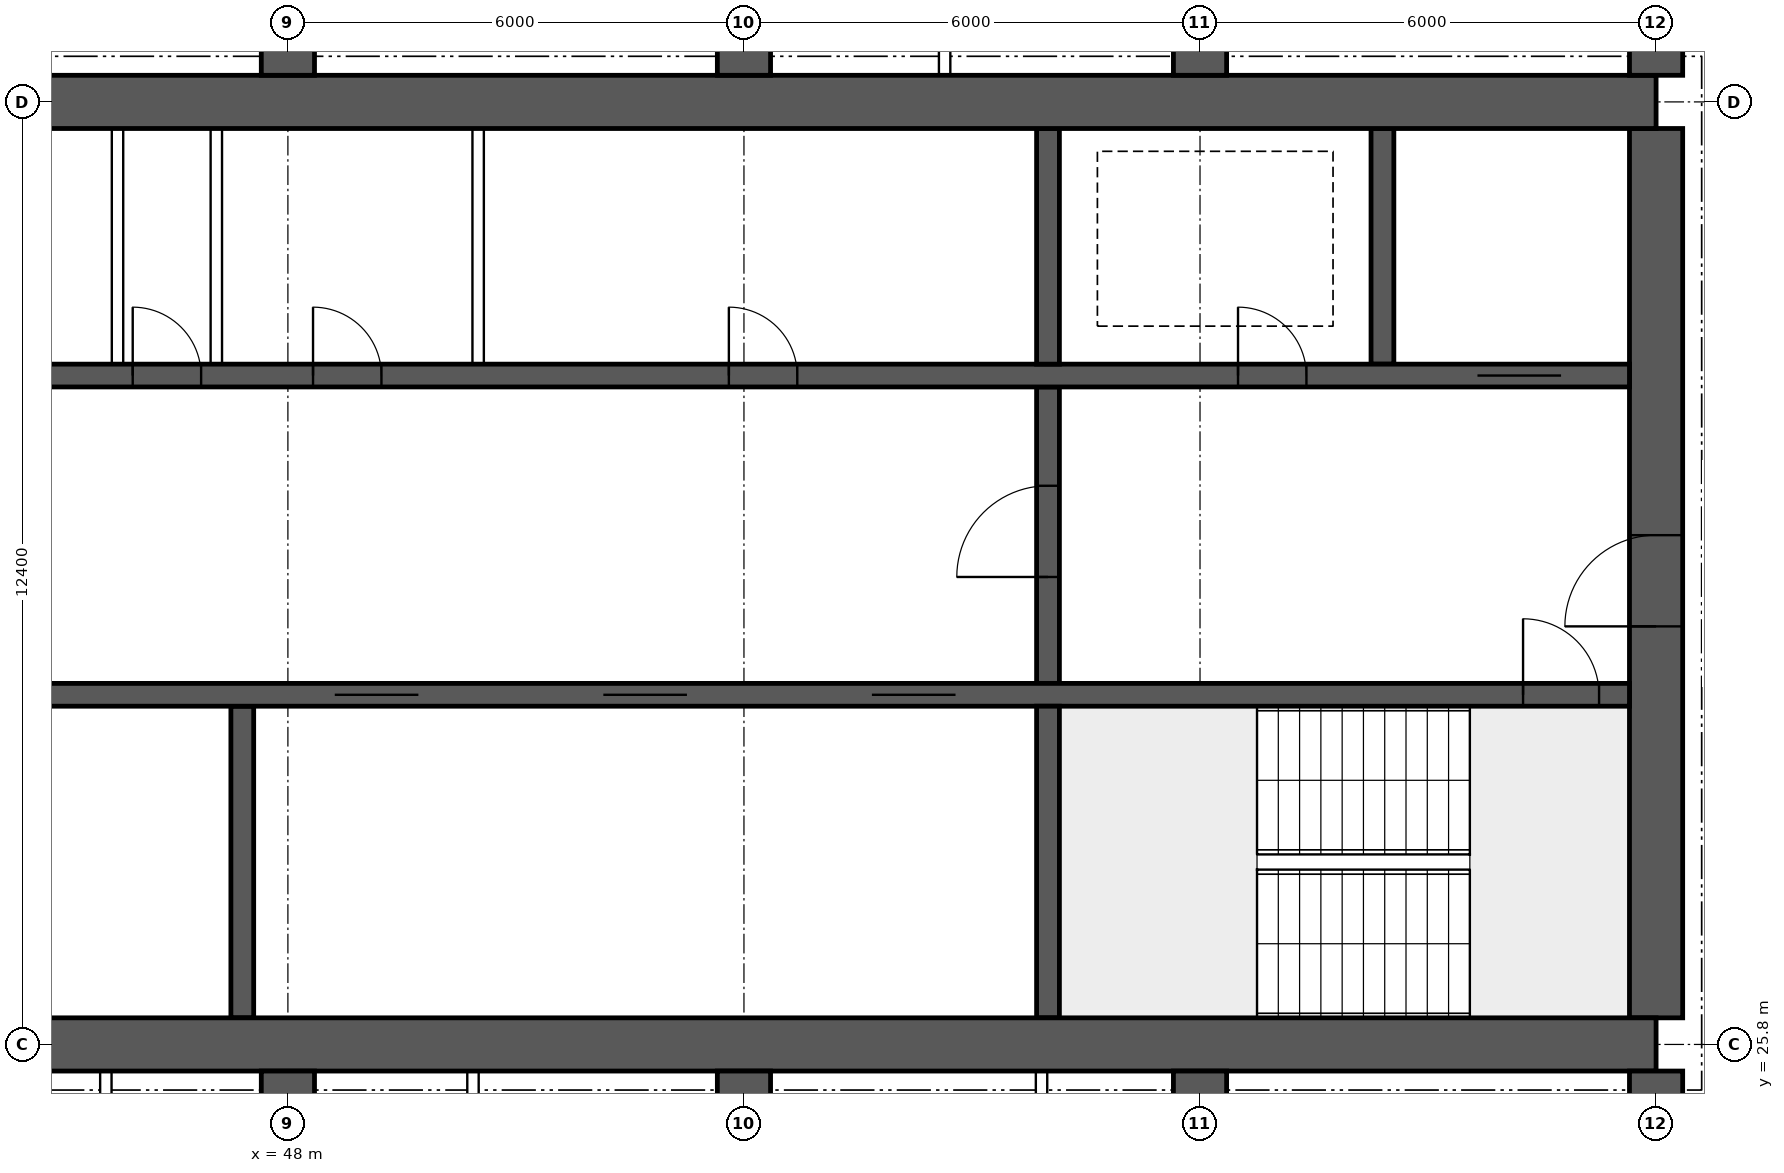
"""IFC4 building model, lengths in metres.
Left out: names, types, materials, properties, quantities, classifications, styles, units other than length and angle.
Written with IfcOpenShell. Run it as: python <this file> out.ifc"""

import sys

from ifc_helpers import new_model, si_unit, direction, frame, frame_2d, origin, place, context, subcontext, project, spatial, rectangle, extrude, element, fill, save


model = new_model("IFC4")
c1 = context("Model", 3, precision=1e-05, world=origin(), true_north=direction((0.0, 1.0)))
c2 = subcontext(c1, "Body", "Model", "MODEL_VIEW")
j1 = project(units=[si_unit("LENGTHUNIT", "METRE"), si_unit("PLANEANGLEUNIT", "RADIAN")], contexts=[c1])
p1 = place(None, origin())
s1 = spatial("IfcSite", under=j1, at=p1, CompositionType="ELEMENT")
p2 = place(p1, origin())
s2 = spatial("IfcBuilding", under=s1, at=p2, CompositionType="ELEMENT")
p3 = place(p2, frame((0.0, 0.0, 254.05)))
s3 = spatial("IfcBuildingStorey", under=s2, at=p3, CompositionType="ELEMENT", Elevation=254.05)
for number, where, z_axis, x_axis in (
    (1, (18.0, 25.8, 0.0), (0.0, 0.0, 1.0), (1.0, 0.0, 0.0)),
    (2, (18.0, 38.2, 0.0), (0.0, 0.0, 1.0), (1.0, 0.0, 0.0)),
):
    element("IfcWall", number, at=place(p3, frame(where, z_axis=z_axis, x_axis=x_axis)), inside=s3, PredefinedType="SHEAR", context=c2, shape_type="SweptSolid", body=[
        extrude(rectangle(XDim=48.0, YDim=0.7, at=frame_2d((24.0, 0.0))), origin(), (0.0, 0.0, 1.0), 3.75),
    ])
p4 = place(p3, frame((66.0, 26.15, 0.0), z_axis=(0.0, 0.0, 1.0), x_axis=(0.0, 1.0, 0.0)))
e3 = element("IfcWall", 3, at=p4, inside=s3, PredefinedType="SHEAR", context=c2, shape_type="SweptSolid", body=[
    extrude(rectangle(XDim=11.7, YDim=0.7, at=frame_2d((5.85, 0.0))), origin(), (0.0, 0.0, 1.0), 3.75),
])
p5 = place(p4, frame((5.15, 0.0, 0.0)))
e4 = element("IfcOpeningElement", 4, at=p5, cuts=e3, PredefinedType="OPENING", context=c2, shape_type="SweptSolid", body=[
    extrude(rectangle(XDim=1.2, YDim=2.1, at=frame_2d((0.6, 1.05))), frame((0.0, 0.36, 0.0), z_axis=(0.0, -1.0, 0.0), x_axis=(1.0, 0.0, 0.0)), (0.0, 0.0, 1.0), 0.72),
])
p6 = place(p3, frame((18.35, 30.4, 0.0), z_axis=(0.0, 0.0, 1.0), x_axis=(1.0, 0.0, 0.0)))
e5 = element("IfcWall", 5, at=p6, inside=s3, PredefinedType="SHEAR", context=c2, shape_type="SweptSolid", body=[
    extrude(rectangle(XDim=47.3, YDim=0.3, at=frame_2d((23.65, 0.0))), origin(), (0.0, 0.0, 1.0), 3.75),
])
p7 = place(p6, frame((0.4, 0.0, 0.0)))
e6 = element("IfcOpeningElement", 6, at=p7, cuts=e5, PredefinedType="OPENING", context=c2, shape_type="SweptSolid", body=[
    extrude(rectangle(XDim=1.0, YDim=2.1, at=frame_2d((0.5, 1.05))), frame((0.0, 0.16, 0.0), z_axis=(0.0, -1.0, 0.0), x_axis=(1.0, 0.0, 0.0)), (0.0, 0.0, 1.0), 0.32),
])
p8 = place(p6, frame((45.9, 0.0, 0.0)))
e7 = element("IfcOpeningElement", 7, at=p8, cuts=e5, PredefinedType="OPENING", context=c2, shape_type="SweptSolid", body=[
    extrude(rectangle(XDim=1.0, YDim=2.1, at=frame_2d((0.5, 1.05))), frame((0.0, 0.16, 0.0), z_axis=(0.0, -1.0, 0.0), x_axis=(1.0, 0.0, 0.0)), (0.0, 0.0, 1.0), 0.32),
])
p9 = place(p6, frame((8.4, 0.0, 0.0)))
e8 = element("IfcOpeningElement", 8, at=p9, cuts=e5, PredefinedType="OPENING", context=c2, shape_type="SweptSolid", body=[
    extrude(rectangle(XDim=1.1, YDim=2.1, at=frame_2d((0.55, 1.05))), frame((0.0, 0.16, 0.0), z_axis=(0.0, -1.0, 0.0), x_axis=(1.0, 0.0, 0.0)), (0.0, 0.0, 1.0), 0.32),
])
p10 = place(p6, frame((11.0, 0.0, 0.0)))
e9 = element("IfcOpeningElement", 9, at=p10, cuts=e5, PredefinedType="OPENING", context=c2, shape_type="SweptSolid", body=[
    extrude(rectangle(XDim=1.1, YDim=2.1, at=frame_2d((0.55, 1.05))), frame((0.0, 0.16, 0.0), z_axis=(0.0, -1.0, 0.0), x_axis=(1.0, 0.0, 0.0)), (0.0, 0.0, 1.0), 0.32),
])
p11 = place(p6, frame((13.6, 0.0, 0.0)))
e10 = element("IfcOpeningElement", 10, at=p11, cuts=e5, PredefinedType="OPENING", context=c2, shape_type="SweptSolid", body=[
    extrude(rectangle(XDim=1.1, YDim=2.1, at=frame_2d((0.55, 1.05))), frame((0.0, 0.16, 0.0), z_axis=(0.0, -1.0, 0.0), x_axis=(1.0, 0.0, 0.0)), (0.0, 0.0, 1.0), 0.32),
])
p12 = place(p6, frame((16.2, 0.0, 0.0)))
e11 = element("IfcOpeningElement", 11, at=p12, cuts=e5, PredefinedType="OPENING", context=c2, shape_type="SweptSolid", body=[
    extrude(rectangle(XDim=1.1, YDim=2.1, at=frame_2d((0.55, 1.05))), frame((0.0, 0.16, 0.0), z_axis=(0.0, -1.0, 0.0), x_axis=(1.0, 0.0, 0.0)), (0.0, 0.0, 1.0), 0.32),
])
p13 = place(p6, frame((18.975, 0.0, 0.0)))
e12 = element("IfcOpeningElement", 12, at=p13, cuts=e5, PredefinedType="OPENING", context=c2, shape_type="SweptSolid", body=[
    extrude(rectangle(XDim=0.9, YDim=2.1, at=frame_2d((0.45, 1.05))), frame((0.0, 0.16, 0.0), z_axis=(0.0, -1.0, 0.0), x_axis=(1.0, 0.0, 0.0)), (0.0, 0.0, 1.0), 0.32),
])
p14 = place(p6, frame((24.475, 0.0, 0.0)))
e13 = element("IfcOpeningElement", 13, at=p14, cuts=e5, PredefinedType="OPENING", context=c2, shape_type="SweptSolid", body=[
    extrude(rectangle(XDim=0.9, YDim=2.1, at=frame_2d((0.45, 1.05))), frame((0.0, 0.16, 0.0), z_axis=(0.0, -1.0, 0.0), x_axis=(1.0, 0.0, 0.0)), (0.0, 0.0, 1.0), 0.32),
])
p15 = place(p6, frame((30.267, 0.0, 0.0)))
e14 = element("IfcOpeningElement", 14, at=p15, cuts=e5, PredefinedType="OPENING", context=c2, shape_type="SweptSolid", body=[
    extrude(rectangle(XDim=1.1, YDim=2.1, at=frame_2d((0.55, 1.05))), frame((0.0, 0.16, 0.0), z_axis=(0.0, -1.0, 0.0), x_axis=(1.0, 0.0, 0.0)), (0.0, 0.0, 1.0), 0.32),
])
p16 = place(p6, frame((33.8, 0.0, 0.0)))
e15 = element("IfcOpeningElement", 15, at=p16, cuts=e5, PredefinedType="OPENING", context=c2, shape_type="SweptSolid", body=[
    extrude(rectangle(XDim=1.1, YDim=2.1, at=frame_2d((0.55, 1.05))), frame((0.0, 0.16, 0.0), z_axis=(0.0, -1.0, 0.0), x_axis=(1.0, 0.0, 0.0)), (0.0, 0.0, 1.0), 0.32),
])
p17 = place(p6, frame((37.333, 0.0, 0.0)))
e16 = element("IfcOpeningElement", 16, at=p17, cuts=e5, PredefinedType="OPENING", context=c2, shape_type="SweptSolid", body=[
    extrude(rectangle(XDim=1.1, YDim=2.1, at=frame_2d((0.55, 1.05))), frame((0.0, 0.16, 0.0), z_axis=(0.0, -1.0, 0.0), x_axis=(1.0, 0.0, 0.0)), (0.0, 0.0, 1.0), 0.32),
])
p18 = place(p3, frame((18.35, 34.6, 0.0), z_axis=(0.0, 0.0, 1.0), x_axis=(1.0, 0.0, 0.0)))
e17 = element("IfcWall", 17, at=p18, inside=s3, PredefinedType="SHEAR", context=c2, shape_type="SweptSolid", body=[
    extrude(rectangle(XDim=47.3, YDim=0.3, at=frame_2d((23.65, 0.0))), origin(), (0.0, 0.0, 1.0), 3.75),
])
p19 = place(p18, frame((0.9, 0.0, 0.0)))
e18 = element("IfcOpeningElement", 18, at=p19, cuts=e17, PredefinedType="OPENING", context=c2, shape_type="SweptSolid", body=[
    extrude(rectangle(XDim=1.1, YDim=2.1, at=frame_2d((0.55, 1.05))), frame((0.0, 0.16, 0.0), z_axis=(0.0, -1.0, 0.0), x_axis=(1.0, 0.0, 0.0)), (0.0, 0.0, 1.0), 0.32),
])
p20 = place(p18, frame((45.3, 0.0, 0.0)))
e19 = element("IfcOpeningElement", 19, at=p20, cuts=e17, PredefinedType="OPENING", context=c2, shape_type="SweptSolid", body=[
    extrude(rectangle(XDim=1.1, YDim=2.1, at=frame_2d((0.55, 1.05))), frame((0.0, 0.16, 0.0), z_axis=(0.0, -1.0, 0.0), x_axis=(1.0, 0.0, 0.0)), (0.0, 0.0, 1.0), 0.32),
])
p21 = place(p18, frame((4.25, 0.0, 0.0)))
e20 = element("IfcOpeningElement", 20, at=p21, cuts=e17, PredefinedType="OPENING", context=c2, shape_type="SweptSolid", body=[
    extrude(rectangle(XDim=0.9, YDim=2.1, at=frame_2d((0.45, 1.05))), frame((0.0, 0.16, 0.0), z_axis=(0.0, -1.0, 0.0), x_axis=(1.0, 0.0, 0.0)), (0.0, 0.0, 1.0), 0.32),
])
p22 = place(p18, frame((42.15, 0.0, 0.0)))
e21 = element("IfcOpeningElement", 21, at=p22, cuts=e17, PredefinedType="OPENING", context=c2, shape_type="SweptSolid", body=[
    extrude(rectangle(XDim=0.9, YDim=2.1, at=frame_2d((0.45, 1.05))), frame((0.0, 0.16, 0.0), z_axis=(0.0, -1.0, 0.0), x_axis=(1.0, 0.0, 0.0)), (0.0, 0.0, 1.0), 0.32),
])
p23 = place(p18, frame((9.025, 0.0, 0.0)))
e22 = element("IfcOpeningElement", 22, at=p23, cuts=e17, PredefinedType="OPENING", context=c2, shape_type="SweptSolid", body=[
    extrude(rectangle(XDim=0.9, YDim=2.1, at=frame_2d((0.45, 1.05))), frame((0.0, 0.16, 0.0), z_axis=(0.0, -1.0, 0.0), x_axis=(1.0, 0.0, 0.0)), (0.0, 0.0, 1.0), 0.32),
])
p24 = place(p18, frame((12.999, 0.0, 0.0)))
e23 = element("IfcOpeningElement", 23, at=p24, cuts=e17, PredefinedType="OPENING", context=c2, shape_type="SweptSolid", body=[
    extrude(rectangle(XDim=0.9, YDim=2.1, at=frame_2d((0.45, 1.05))), frame((0.0, 0.16, 0.0), z_axis=(0.0, -1.0, 0.0), x_axis=(1.0, 0.0, 0.0)), (0.0, 0.0, 1.0), 0.32),
])
p25 = place(p18, frame((16.646, 0.0, 0.0)))
e24 = element("IfcOpeningElement", 24, at=p25, cuts=e17, PredefinedType="OPENING", context=c2, shape_type="SweptSolid", body=[
    extrude(rectangle(XDim=0.9, YDim=2.1, at=frame_2d((0.45, 1.05))), frame((0.0, 0.16, 0.0), z_axis=(0.0, -1.0, 0.0), x_axis=(1.0, 0.0, 0.0)), (0.0, 0.0, 1.0), 0.32),
])
p26 = place(p18, frame((20.405, 0.0, 0.0)))
e25 = element("IfcOpeningElement", 25, at=p26, cuts=e17, PredefinedType="OPENING", context=c2, shape_type="SweptSolid", body=[
    extrude(rectangle(XDim=0.9, YDim=2.1, at=frame_2d((0.45, 1.05))), frame((0.0, 0.16, 0.0), z_axis=(0.0, -1.0, 0.0), x_axis=(1.0, 0.0, 0.0)), (0.0, 0.0, 1.0), 0.32),
])
p27 = place(p18, frame((24.811, 0.0, 0.0)))
e26 = element("IfcOpeningElement", 26, at=p27, cuts=e17, PredefinedType="OPENING", context=c2, shape_type="SweptSolid", body=[
    extrude(rectangle(XDim=0.9, YDim=2.1, at=frame_2d((0.45, 1.05))), frame((0.0, 0.16, 0.0), z_axis=(0.0, -1.0, 0.0), x_axis=(1.0, 0.0, 0.0)), (0.0, 0.0, 1.0), 0.32),
])
p28 = place(p18, frame((27.608, 0.0, 0.0)))
e27 = element("IfcOpeningElement", 27, at=p28, cuts=e17, PredefinedType="OPENING", context=c2, shape_type="SweptSolid", body=[
    extrude(rectangle(XDim=0.9, YDim=2.1, at=frame_2d((0.45, 1.05))), frame((0.0, 0.16, 0.0), z_axis=(0.0, -1.0, 0.0), x_axis=(1.0, 0.0, 0.0)), (0.0, 0.0, 1.0), 0.32),
])
p29 = place(p18, frame((29.981, 0.0, 0.0)))
e28 = element("IfcOpeningElement", 28, at=p29, cuts=e17, PredefinedType="OPENING", context=c2, shape_type="SweptSolid", body=[
    extrude(rectangle(XDim=0.9, YDim=2.1, at=frame_2d((0.45, 1.05))), frame((0.0, 0.16, 0.0), z_axis=(0.0, -1.0, 0.0), x_axis=(1.0, 0.0, 0.0)), (0.0, 0.0, 1.0), 0.32),
])
p30 = place(p18, frame((35.451, 0.0, 0.0)))
e29 = element("IfcOpeningElement", 29, at=p30, cuts=e17, PredefinedType="OPENING", context=c2, shape_type="SweptSolid", body=[
    extrude(rectangle(XDim=0.9, YDim=2.1, at=frame_2d((0.45, 1.05))), frame((0.0, 0.16, 0.0), z_axis=(0.0, -1.0, 0.0), x_axis=(1.0, 0.0, 0.0)), (0.0, 0.0, 1.0), 0.32),
])
p31 = place(p3, frame((58.0, 26.15, 0.0), z_axis=(0.0, 0.0, 1.0), x_axis=(0.0, 1.0, 0.0)))
e30 = element("IfcWall", 30, at=p31, inside=s3, PredefinedType="SHEAR", context=c2, shape_type="SweptSolid", body=[
    extrude(rectangle(XDim=4.1, YDim=0.3, at=frame_2d((2.05, 0.0))), origin(), (0.0, 0.0, 1.0), 3.75),
])
p32 = place(p3, frame((58.0, 30.55, 0.0), z_axis=(0.0, 0.0, 1.0), x_axis=(0.0, 1.0, 0.0)))
e31 = element("IfcWall", 31, at=p32, inside=s3, PredefinedType="SHEAR", context=c2, shape_type="SweptSolid", body=[
    extrude(rectangle(XDim=3.9, YDim=0.3, at=frame_2d((1.95, 0.0))), origin(), (0.0, 0.0, 1.0), 3.75),
])
p33 = place(p32, frame((1.4, 0.0, 0.0)))
e32 = element("IfcOpeningElement", 32, at=p33, cuts=e31, PredefinedType="OPENING", context=c2, shape_type="SweptSolid", body=[
    extrude(rectangle(XDim=1.2, YDim=2.1, at=frame_2d((0.6, 1.05))), frame((0.0, 0.16, 0.0), z_axis=(0.0, -1.0, 0.0), x_axis=(1.0, 0.0, 0.0)), (0.0, 0.0, 1.0), 0.32),
])
for number, where, z_axis, x_axis in (
    (33, (62.4, 34.75, 0.0), (0.0, 0.0, 1.0), (0.0, 1.0, 0.0)),
    (34, (58.0, 34.75, 0.0), (0.0, 0.0, 1.0), (0.0, 1.0, 0.0)),
):
    element("IfcWall", number, at=place(p3, frame(where, z_axis=z_axis, x_axis=x_axis)), inside=s3, PredefinedType="SHEAR", context=c2, shape_type="SweptSolid", body=[
        extrude(rectangle(XDim=3.1, YDim=0.3, at=frame_2d((1.55, 0.0))), origin(), (0.0, 0.0, 1.0), 3.75),
    ])
p34 = place(p3, frame((47.4, 26.15, 0.0), z_axis=(0.0, 0.0, 1.0), x_axis=(0.0, 1.0, 0.0)))
e35 = element("IfcWall", 35, at=p34, inside=s3, PredefinedType="SHEAR", context=c2, shape_type="SweptSolid", body=[
    extrude(rectangle(XDim=4.1, YDim=0.3, at=frame_2d((2.05, 0.0))), origin(), (0.0, 0.0, 1.0), 3.75),
])
for number, where, z_axis, x_axis in (
    (36, (48.0, 18.4, 0.0), (0.0, 0.0, 1.0), (0.0, 1.0, 0.0)),
    (37, (48.0, 38.55, 0.0), (0.0, 0.0, 1.0), (0.0, 1.0, 0.0)),
    (38, (54.0, 18.4, 0.0), (0.0, 0.0, 1.0), (0.0, 1.0, 0.0)),
    (39, (54.0, 38.55, 0.0), (0.0, 0.0, 1.0), (0.0, 1.0, 0.0)),
    (40, (60.0, 18.4, 0.0), (0.0, 0.0, 1.0), (0.0, 1.0, 0.0)),
    (41, (60.0, 38.55, 0.0), (0.0, 0.0, 1.0), (0.0, 1.0, 0.0)),
    (42, (66.0, 18.4, 0.0), (0.0, 0.0, 1.0), (0.0, 1.0, 0.0)),
    (43, (66.0, 38.55, 0.0), (0.0, 0.0, 1.0), (0.0, 1.0, 0.0)),
):
    element("IfcWall", number, at=place(p3, frame(where, z_axis=z_axis, x_axis=x_axis)), inside=s3, PredefinedType="SHEAR", context=c2, shape_type="SweptSolid", body=[
        extrude(rectangle(XDim=7.05, YDim=0.7, at=frame_2d((3.525, 0.0))), origin(), (0.0, 0.0, 1.0), 3.75),
    ])
for number, where, z_axis, x_axis in (
    (44, (45.758, 34.75, 0.0), (0.0, 0.0, 1.0), (0.0, 1.0, 0.0)),
    (45, (47.058, 34.75, 0.0), (0.0, 0.0, 1.0), (0.0, 1.0, 0.0)),
    (46, (50.503, 34.75, 0.0), (0.0, 0.0, 1.0), (0.0, 1.0, 0.0)),
):
    element("IfcWall", number, at=place(p3, frame(where, z_axis=z_axis, x_axis=x_axis)), inside=s3, PredefinedType="SOLIDWALL", context=c2, shape_type="SweptSolid", body=[
        extrude(rectangle(XDim=3.1, YDim=0.15, at=frame_2d((1.55, 0.0))), origin(), (0.0, 0.0, 1.0), 3.45),
    ])
for number, where, z_axis, x_axis in (
    (47, (45.605, 18.5, 0.0), (0.0, 0.0, 1.0), (0.0, 1.0, 0.0)),
    (48, (50.435, 18.5, 0.0), (0.0, 0.0, 1.0), (0.0, 1.0, 0.0)),
    (49, (57.915, 18.5, 0.0), (0.0, 0.0, 1.0), (0.0, 1.0, 0.0)),
    (50, (56.64, 38.55, 0.0), (0.0, 0.0, 1.0), (0.0, 1.0, 0.0)),
):
    element("IfcWall", number, at=place(p3, frame(where, z_axis=z_axis, x_axis=x_axis)), inside=s3, PredefinedType="PARTITIONING", context=c2, shape_type="SweptSolid", body=[
        extrude(rectangle(XDim=6.95, YDim=0.15, at=frame_2d((3.475, 0.0))), origin(), (0.0, 0.0, 1.0), 3.45),
    ])
p35 = place(p5, origin())
e51 = element("IfcDoor", 51, at=p35, inside=s3, OperationType="SINGLE_SWING_LEFT", PredefinedType="DOOR", context=c2, shape_type="SweptSolid", body=[
    extrude(rectangle(XDim=1.2, YDim=2.1, at=frame_2d((0.6, 1.05))), frame((0.0, 0.025, 0.0), z_axis=(0.0, -1.0, 0.0), x_axis=(1.0, 0.0, 0.0)), (0.0, 0.0, 1.0), 0.05),
])
fill(e4, e51)
p36 = place(p8, origin())
e52 = element("IfcDoor", 52, at=p36, inside=s3, OperationType="SINGLE_SWING_LEFT", PredefinedType="DOOR", context=c2, shape_type="SweptSolid", body=[
    extrude(rectangle(XDim=1.0, YDim=2.1, at=frame_2d((0.5, 1.05))), frame((0.0, 0.025, 0.0), z_axis=(0.0, -1.0, 0.0), x_axis=(1.0, 0.0, 0.0)), (0.0, 0.0, 1.0), 0.05),
])
fill(e7, e52)
p37 = place(p20, origin())
e53 = element("IfcDoor", 53, at=p37, inside=s3, OperationType="DOUBLE_DOOR_SLIDING", PredefinedType="DOOR", context=c2, shape_type="SweptSolid", body=[
    extrude(rectangle(XDim=1.1, YDim=2.1, at=frame_2d((0.55, 1.05))), frame((0.0, 0.025, 0.0), z_axis=(0.0, -1.0, 0.0), x_axis=(1.0, 0.0, 0.0)), (0.0, 0.0, 1.0), 0.05),
])
fill(e19, e53)
p38 = place(p22, origin())
e54 = element("IfcDoor", 54, at=p38, inside=s3, OperationType="SINGLE_SWING_LEFT", PredefinedType="DOOR", context=c2, shape_type="SweptSolid", body=[
    extrude(rectangle(XDim=0.9, YDim=2.1, at=frame_2d((0.45, 1.05))), frame((0.0, 0.025, 0.0), z_axis=(0.0, -1.0, 0.0), x_axis=(1.0, 0.0, 0.0)), (0.0, 0.0, 1.0), 0.05),
])
fill(e21, e54)
p39 = place(p33, origin())
e55 = element("IfcDoor", 55, at=p39, inside=s3, OperationType="SINGLE_SWING_LEFT", PredefinedType="DOOR", context=c2, shape_type="SweptSolid", body=[
    extrude(rectangle(XDim=1.2, YDim=2.1, at=frame_2d((0.6, 1.05))), frame((0.0, 0.025, 0.0), z_axis=(0.0, -1.0, 0.0), x_axis=(1.0, 0.0, 0.0)), (0.0, 0.0, 1.0), 0.05),
])
fill(e32, e55)
p40 = place(p28, origin())
e56 = element("IfcDoor", 56, at=p40, inside=s3, OperationType="SINGLE_SWING_LEFT", PredefinedType="DOOR", context=c2, shape_type="SweptSolid", body=[
    extrude(rectangle(XDim=0.9, YDim=2.1, at=frame_2d((0.45, 1.05))), frame((0.0, 0.025, 0.0), z_axis=(0.0, -1.0, 0.0), x_axis=(1.0, 0.0, 0.0)), (0.0, 0.0, 1.0), 0.05),
])
fill(e27, e56)
p41 = place(p29, origin())
e57 = element("IfcDoor", 57, at=p41, inside=s3, OperationType="SINGLE_SWING_LEFT", PredefinedType="DOOR", context=c2, shape_type="SweptSolid", body=[
    extrude(rectangle(XDim=0.9, YDim=2.1, at=frame_2d((0.45, 1.05))), frame((0.0, 0.025, 0.0), z_axis=(0.0, -1.0, 0.0), x_axis=(1.0, 0.0, 0.0)), (0.0, 0.0, 1.0), 0.05),
])
fill(e28, e57)
p42 = place(p30, origin())
e58 = element("IfcDoor", 58, at=p42, inside=s3, OperationType="SINGLE_SWING_LEFT", PredefinedType="DOOR", context=c2, shape_type="SweptSolid", body=[
    extrude(rectangle(XDim=0.9, YDim=2.1, at=frame_2d((0.45, 1.05))), frame((0.0, 0.025, 0.0), z_axis=(0.0, -1.0, 0.0), x_axis=(1.0, 0.0, 0.0)), (0.0, 0.0, 1.0), 0.05),
])
fill(e29, e58)
p43 = place(p15, origin())
e59 = element("IfcDoor", 59, at=p43, inside=s3, OperationType="DOUBLE_DOOR_SLIDING", PredefinedType="DOOR", context=c2, shape_type="SweptSolid", body=[
    extrude(rectangle(XDim=1.1, YDim=2.1, at=frame_2d((0.55, 1.05))), frame((0.0, 0.025, 0.0), z_axis=(0.0, -1.0, 0.0), x_axis=(1.0, 0.0, 0.0)), (0.0, 0.0, 1.0), 0.05),
])
fill(e14, e59)
p44 = place(p16, origin())
e60 = element("IfcDoor", 60, at=p44, inside=s3, OperationType="DOUBLE_DOOR_SLIDING", PredefinedType="DOOR", context=c2, shape_type="SweptSolid", body=[
    extrude(rectangle(XDim=1.1, YDim=2.1, at=frame_2d((0.55, 1.05))), frame((0.0, 0.025, 0.0), z_axis=(0.0, -1.0, 0.0), x_axis=(1.0, 0.0, 0.0)), (0.0, 0.0, 1.0), 0.05),
])
fill(e15, e60)
p45 = place(p17, origin())
e61 = element("IfcDoor", 61, at=p45, inside=s3, OperationType="DOUBLE_DOOR_SLIDING", PredefinedType="DOOR", context=c2, shape_type="SweptSolid", body=[
    extrude(rectangle(XDim=1.1, YDim=2.1, at=frame_2d((0.55, 1.05))), frame((0.0, 0.025, 0.0), z_axis=(0.0, -1.0, 0.0), x_axis=(1.0, 0.0, 0.0)), (0.0, 0.0, 1.0), 0.05),
])
fill(e16, e61)
save(model, sys.argv[1])
